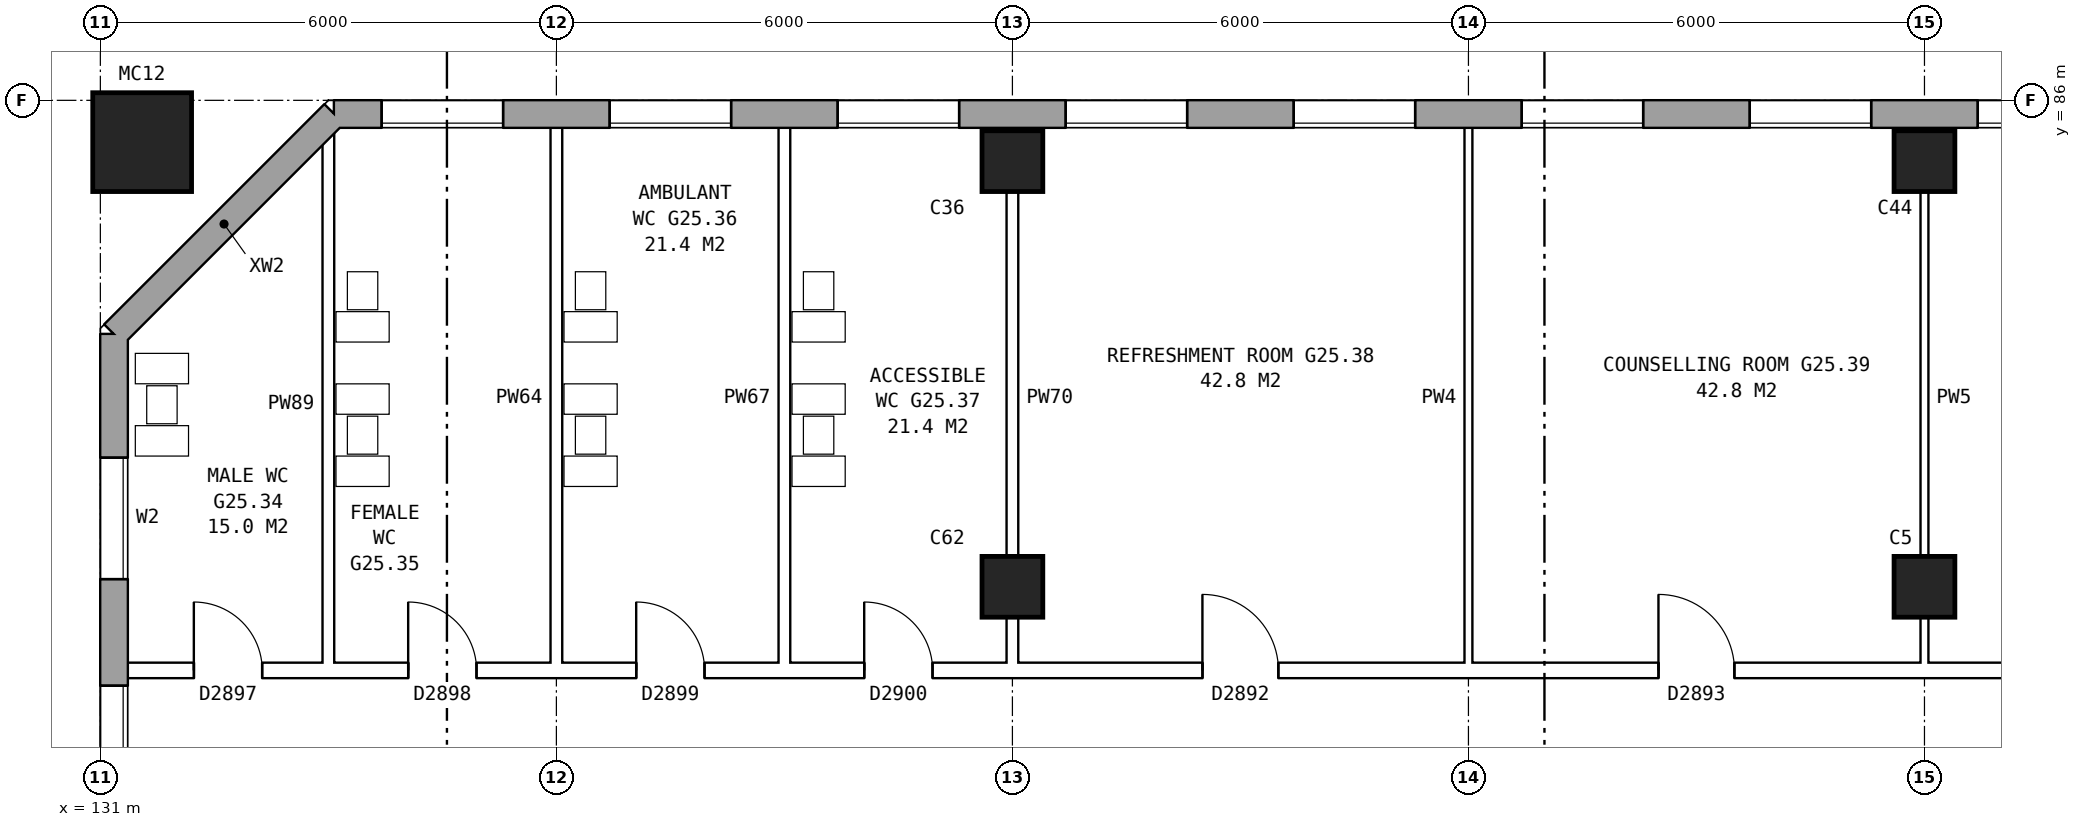
"""IFC4 building model, lengths in metres.
Left out: names, types, materials, properties, quantities, classifications, styles, units other than length and angle.
Written with IfcOpenShell. Run it as: python <this file> out.ifc"""

import sys

from ifc_helpers import new_model, si_unit, direction, frame, frame_2d, origin, origin_2d, place, context, subcontext, project, spatial, rectangle, hollow_rectangle, extrude, element, fill, save


model = new_model("IFC4")
c1 = context("Model", 3, precision=1e-05, world=origin(), true_north=direction((0.0, 1.0)))
c2 = subcontext(c1, "Body", "Model", "MODEL_VIEW")
j1 = project(units=[si_unit("LENGTHUNIT", "METRE"), si_unit("PLANEANGLEUNIT", "RADIAN")], contexts=[c1])
p1 = place(None, origin())
s1 = spatial("IfcSite", under=j1, at=p1, CompositionType="ELEMENT")
p2 = place(p1, origin())
s2 = spatial("IfcBuilding", under=s1, at=p2, CompositionType="ELEMENT")
p3 = place(p2, frame((0.0, 0.0, 90.2)))
s3 = spatial("IfcBuildingStorey", under=s2, at=p3, CompositionType="ELEMENT", Elevation=90.2)
for number, where, z_axis, x_axis in (
    (1, (143.0, 79.6, 0.0), (0.0, 0.0, 1.0), (1.0, 0.0, 0.0)),
    (2, (143.0, 85.2, 0.0), (0.0, 0.0, 1.0), (1.0, 0.0, 0.0)),
    (3, (155.0, 79.6, 0.0), (0.0, 0.0, 1.0), (1.0, 0.0, 0.0)),
    (4, (155.0, 85.2, 0.0), (0.0, 0.0, 1.0), (1.0, 0.0, 0.0)),
):
    element("IfcColumn", number, at=place(p3, frame(where, z_axis=z_axis, x_axis=x_axis)), inside=s3, PredefinedType="COLUMN", context=c2, shape_type="SweptSolid", body=[
        extrude(rectangle(XDim=0.8, YDim=0.8, at=origin_2d()), origin(), (0.0, 0.0, 1.0), 5.6),
    ])
p4 = place(p3, frame((131.55, 85.45, 0.0), z_axis=(0.0, 0.0, 1.0), x_axis=(1.0, 0.0, 0.0)))
e5 = element("IfcColumn", 5, at=p4, inside=s3, PredefinedType="COLUMN", context=c2, shape_type="SweptSolid", body=[
    extrude(hollow_rectangle(XDim=1.3, YDim=1.3, WallThickness=0.07, at=origin_2d()), origin(), (0.0, 0.0, 1.0), 6.2),
])
p5 = place(p3, frame((170.925, 85.82, 0.0), z_axis=(0.0, 0.0, 1.0), x_axis=(-1.0, 0.0, 0.0)))
e6 = element("IfcWall", 6, at=p5, inside=s3, PredefinedType="STANDARD", context=c2, shape_type="SweptSolid", body=[
    extrude(rectangle(XDim=36.851, YDim=0.36, at=frame_2d((18.425, 0.0))), origin(), (0.0, 0.0, 1.0), 5.6),
])
p6 = place(p5, frame((1.625, 0.0, 0.15)))
e7 = element("IfcOpeningElement", 7, at=p6, cuts=e6, PredefinedType="OPENING", context=c2, shape_type="SweptSolid", body=[
    extrude(rectangle(XDim=1.6, YDim=2.4, at=frame_2d((0.8, 1.2))), frame((0.0, 0.19, 0.0), z_axis=(0.0, -1.0, 0.0), x_axis=(1.0, 0.0, 0.0)), (0.0, 0.0, 1.0), 0.38),
])
p7 = place(p5, frame((4.625, 0.0, 0.15)))
e8 = element("IfcOpeningElement", 8, at=p7, cuts=e6, PredefinedType="OPENING", context=c2, shape_type="SweptSolid", body=[
    extrude(rectangle(XDim=1.6, YDim=2.4, at=frame_2d((0.8, 1.2))), frame((0.0, 0.19, 0.0), z_axis=(0.0, -1.0, 0.0), x_axis=(1.0, 0.0, 0.0)), (0.0, 0.0, 1.0), 0.38),
])
p8 = place(p5, frame((7.625, 0.0, 0.15)))
e9 = element("IfcOpeningElement", 9, at=p8, cuts=e6, PredefinedType="OPENING", context=c2, shape_type="SweptSolid", body=[
    extrude(rectangle(XDim=1.6, YDim=2.4, at=frame_2d((0.8, 1.2))), frame((0.0, 0.19, 0.0), z_axis=(0.0, -1.0, 0.0), x_axis=(1.0, 0.0, 0.0)), (0.0, 0.0, 1.0), 0.38),
])
p9 = place(p5, frame((10.625, 0.0, 0.15)))
e10 = element("IfcOpeningElement", 10, at=p9, cuts=e6, PredefinedType="OPENING", context=c2, shape_type="SweptSolid", body=[
    extrude(rectangle(XDim=1.6, YDim=2.4, at=frame_2d((0.8, 1.2))), frame((0.0, 0.19, 0.0), z_axis=(0.0, -1.0, 0.0), x_axis=(1.0, 0.0, 0.0)), (0.0, 0.0, 1.0), 0.38),
])
p10 = place(p5, frame((13.625, 0.0, 0.15)))
e11 = element("IfcOpeningElement", 11, at=p10, cuts=e6, PredefinedType="OPENING", context=c2, shape_type="SweptSolid", body=[
    extrude(rectangle(XDim=1.6, YDim=2.4, at=frame_2d((0.8, 1.2))), frame((0.0, 0.19, 0.0), z_axis=(0.0, -1.0, 0.0), x_axis=(1.0, 0.0, 0.0)), (0.0, 0.0, 1.0), 0.38),
])
p11 = place(p5, frame((16.625, 0.0, 0.15)))
e12 = element("IfcOpeningElement", 12, at=p11, cuts=e6, PredefinedType="OPENING", context=c2, shape_type="SweptSolid", body=[
    extrude(rectangle(XDim=1.6, YDim=2.4, at=frame_2d((0.8, 1.2))), frame((0.0, 0.19, 0.0), z_axis=(0.0, -1.0, 0.0), x_axis=(1.0, 0.0, 0.0)), (0.0, 0.0, 1.0), 0.38),
])
p12 = place(p5, frame((19.625, 0.0, 0.15)))
e13 = element("IfcOpeningElement", 13, at=p12, cuts=e6, PredefinedType="OPENING", context=c2, shape_type="SweptSolid", body=[
    extrude(rectangle(XDim=1.6, YDim=2.4, at=frame_2d((0.8, 1.2))), frame((0.0, 0.19, 0.0), z_axis=(0.0, -1.0, 0.0), x_axis=(1.0, 0.0, 0.0)), (0.0, 0.0, 1.0), 0.38),
])
p13 = place(p5, frame((22.625, 0.0, 0.15)))
e14 = element("IfcOpeningElement", 14, at=p13, cuts=e6, PredefinedType="OPENING", context=c2, shape_type="SweptSolid", body=[
    extrude(rectangle(XDim=1.6, YDim=2.4, at=frame_2d((0.8, 1.2))), frame((0.0, 0.19, 0.0), z_axis=(0.0, -1.0, 0.0), x_axis=(1.0, 0.0, 0.0)), (0.0, 0.0, 1.0), 0.38),
])
p14 = place(p5, frame((25.625, 0.0, 0.15)))
e15 = element("IfcOpeningElement", 15, at=p14, cuts=e6, PredefinedType="OPENING", context=c2, shape_type="SweptSolid", body=[
    extrude(rectangle(XDim=1.6, YDim=2.4, at=frame_2d((0.8, 1.2))), frame((0.0, 0.19, 0.0), z_axis=(0.0, -1.0, 0.0), x_axis=(1.0, 0.0, 0.0)), (0.0, 0.0, 1.0), 0.38),
])
p15 = place(p5, frame((28.625, 0.0, 0.15)))
e16 = element("IfcOpeningElement", 16, at=p15, cuts=e6, PredefinedType="OPENING", context=c2, shape_type="SweptSolid", body=[
    extrude(rectangle(XDim=1.6, YDim=2.4, at=frame_2d((0.8, 1.2))), frame((0.0, 0.19, 0.0), z_axis=(0.0, -1.0, 0.0), x_axis=(1.0, 0.0, 0.0)), (0.0, 0.0, 1.0), 0.38),
])
p16 = place(p5, frame((31.625, 0.0, 0.15)))
e17 = element("IfcOpeningElement", 17, at=p16, cuts=e6, PredefinedType="OPENING", context=c2, shape_type="SweptSolid", body=[
    extrude(rectangle(XDim=1.6, YDim=2.4, at=frame_2d((0.8, 1.2))), frame((0.0, 0.19, 0.0), z_axis=(0.0, -1.0, 0.0), x_axis=(1.0, 0.0, 0.0)), (0.0, 0.0, 1.0), 0.38),
])
p17 = place(p5, frame((34.625, 0.0, 0.15)))
e18 = element("IfcOpeningElement", 18, at=p17, cuts=e6, PredefinedType="OPENING", context=c2, shape_type="SweptSolid", body=[
    extrude(rectangle(XDim=1.6, YDim=2.4, at=frame_2d((0.8, 1.2))), frame((0.0, 0.19, 0.0), z_axis=(0.0, -1.0, 0.0), x_axis=(1.0, 0.0, 0.0)), (0.0, 0.0, 1.0), 0.38),
])
p18 = place(p3, frame((134.075, 85.82, 0.0), z_axis=(0.0, 0.0, 1.0), x_axis=(-0.707106781187, -0.707106781187, 0.0)))
e19 = element("IfcWall", 19, at=p18, inside=s3, PredefinedType="STANDARD", context=c2, shape_type="SweptSolid", body=[
    extrude(rectangle(XDim=4.094, YDim=0.36, at=frame_2d((2.047, 0.0))), origin(), (0.0, 0.0, 1.0), 5.6),
])
p19 = place(p3, frame((131.18, 82.925, 0.0), z_axis=(0.0, 0.0, 1.0), x_axis=(0.0, -1.0, 0.0)))
e20 = element("IfcWall", 20, at=p19, inside=s3, PredefinedType="STANDARD", context=c2, shape_type="SweptSolid", body=[
    extrude(rectangle(XDim=25.851, YDim=0.36, at=frame_2d((12.925, 0.0))), origin(), (0.0, 0.0, 1.0), 5.6),
])
p20 = place(p19, frame((1.625, 0.0, 0.15)))
e21 = element("IfcOpeningElement", 21, at=p20, cuts=e20, PredefinedType="OPENING", context=c2, shape_type="SweptSolid", body=[
    extrude(rectangle(XDim=1.6, YDim=2.4, at=frame_2d((0.8, 1.2))), frame((0.0, 0.19, 0.0), z_axis=(0.0, -1.0, 0.0), x_axis=(1.0, 0.0, 0.0)), (0.0, 0.0, 1.0), 0.38),
])
p21 = place(p19, frame((4.625, 0.0, 0.15)))
e22 = element("IfcOpeningElement", 22, at=p21, cuts=e20, PredefinedType="OPENING", context=c2, shape_type="SweptSolid", body=[
    extrude(rectangle(XDim=1.6, YDim=2.4, at=frame_2d((0.8, 1.2))), frame((0.0, 0.19, 0.0), z_axis=(0.0, -1.0, 0.0), x_axis=(1.0, 0.0, 0.0)), (0.0, 0.0, 1.0), 0.38),
])
p22 = place(p19, frame((19.625, 0.0, 0.15)))
e23 = element("IfcOpeningElement", 23, at=p22, cuts=e20, PredefinedType="OPENING", context=c2, shape_type="SweptSolid", body=[
    extrude(rectangle(XDim=1.6, YDim=2.4, at=frame_2d((0.8, 1.2))), frame((0.0, 0.19, 0.0), z_axis=(0.0, -1.0, 0.0), x_axis=(1.0, 0.0, 0.0)), (0.0, 0.0, 1.0), 0.38),
])
p23 = place(p19, frame((22.625, 0.0, 0.15)))
e24 = element("IfcOpeningElement", 24, at=p23, cuts=e20, PredefinedType="OPENING", context=c2, shape_type="SweptSolid", body=[
    extrude(rectangle(XDim=1.6, YDim=2.4, at=frame_2d((0.8, 1.2))), frame((0.0, 0.19, 0.0), z_axis=(0.0, -1.0, 0.0), x_axis=(1.0, 0.0, 0.0)), (0.0, 0.0, 1.0), 0.38),
])
p24 = place(p3, frame((131.24, 78.5, 0.0), z_axis=(0.0, 0.0, 1.0), x_axis=(1.0, 0.0, 0.0)))
e25 = element("IfcWall", 25, at=p24, inside=s3, PredefinedType="PARTITIONING", context=c2, shape_type="SweptSolid", body=[
    extrude(rectangle(XDim=42.52, YDim=0.2, at=frame_2d((21.26, 0.0))), origin(), (0.0, 0.0, 1.0), 5.6),
])
p25 = place(p24, frame((0.99, 0.0, 0.0)))
e26 = element("IfcOpeningElement", 26, at=p25, cuts=e25, PredefinedType="OPENING", context=c2, shape_type="SweptSolid", body=[
    extrude(rectangle(XDim=0.9, YDim=2.1, at=frame_2d((0.45, 1.05))), frame((0.0, 0.11, 0.0), z_axis=(0.0, -1.0, 0.0), x_axis=(1.0, 0.0, 0.0)), (0.0, 0.0, 1.0), 0.22),
])
p26 = place(p24, frame((3.81, 0.0, 0.0)))
e27 = element("IfcOpeningElement", 27, at=p26, cuts=e25, PredefinedType="OPENING", context=c2, shape_type="SweptSolid", body=[
    extrude(rectangle(XDim=0.9, YDim=2.1, at=frame_2d((0.45, 1.05))), frame((0.0, 0.11, 0.0), z_axis=(0.0, -1.0, 0.0), x_axis=(1.0, 0.0, 0.0)), (0.0, 0.0, 1.0), 0.22),
])
p27 = place(p24, frame((6.81, 0.0, 0.0)))
e28 = element("IfcOpeningElement", 28, at=p27, cuts=e25, PredefinedType="OPENING", context=c2, shape_type="SweptSolid", body=[
    extrude(rectangle(XDim=0.9, YDim=2.1, at=frame_2d((0.45, 1.05))), frame((0.0, 0.11, 0.0), z_axis=(0.0, -1.0, 0.0), x_axis=(1.0, 0.0, 0.0)), (0.0, 0.0, 1.0), 0.22),
])
p28 = place(p24, frame((9.81, 0.0, 0.0)))
e29 = element("IfcOpeningElement", 29, at=p28, cuts=e25, PredefinedType="OPENING", context=c2, shape_type="SweptSolid", body=[
    extrude(rectangle(XDim=0.9, YDim=2.1, at=frame_2d((0.45, 1.05))), frame((0.0, 0.11, 0.0), z_axis=(0.0, -1.0, 0.0), x_axis=(1.0, 0.0, 0.0)), (0.0, 0.0, 1.0), 0.22),
])
p29 = place(p24, frame((14.26, 0.0, 0.0)))
e30 = element("IfcOpeningElement", 30, at=p29, cuts=e25, PredefinedType="OPENING", context=c2, shape_type="SweptSolid", body=[
    extrude(rectangle(XDim=1.0, YDim=2.1, at=frame_2d((0.5, 1.05))), frame((0.0, 0.11, 0.0), z_axis=(0.0, -1.0, 0.0), x_axis=(1.0, 0.0, 0.0)), (0.0, 0.0, 1.0), 0.22),
])
p30 = place(p24, frame((20.26, 0.0, 0.0)))
e31 = element("IfcOpeningElement", 31, at=p30, cuts=e25, PredefinedType="OPENING", context=c2, shape_type="SweptSolid", body=[
    extrude(rectangle(XDim=1.0, YDim=2.1, at=frame_2d((0.5, 1.05))), frame((0.0, 0.11, 0.0), z_axis=(0.0, -1.0, 0.0), x_axis=(1.0, 0.0, 0.0)), (0.0, 0.0, 1.0), 0.22),
])
p31 = place(p24, frame((26.26, 0.0, 0.0)))
e32 = element("IfcOpeningElement", 32, at=p31, cuts=e25, PredefinedType="OPENING", context=c2, shape_type="SweptSolid", body=[
    extrude(rectangle(XDim=1.0, YDim=2.1, at=frame_2d((0.5, 1.05))), frame((0.0, 0.11, 0.0), z_axis=(0.0, -1.0, 0.0), x_axis=(1.0, 0.0, 0.0)), (0.0, 0.0, 1.0), 0.22),
])
p32 = place(p24, frame((32.26, 0.0, 0.0)))
e33 = element("IfcOpeningElement", 33, at=p32, cuts=e25, PredefinedType="OPENING", context=c2, shape_type="SweptSolid", body=[
    extrude(rectangle(XDim=1.0, YDim=2.1, at=frame_2d((0.5, 1.05))), frame((0.0, 0.11, 0.0), z_axis=(0.0, -1.0, 0.0), x_axis=(1.0, 0.0, 0.0)), (0.0, 0.0, 1.0), 0.22),
])
p33 = place(p24, frame((38.58, 0.0, 0.0)))
e34 = element("IfcOpeningElement", 34, at=p33, cuts=e25, PredefinedType="OPENING", context=c2, shape_type="SweptSolid", body=[
    extrude(rectangle(XDim=1.0, YDim=2.1, at=frame_2d((0.5, 1.05))), frame((0.0, 0.11, 0.0), z_axis=(0.0, -1.0, 0.0), x_axis=(1.0, 0.0, 0.0)), (0.0, 0.0, 1.0), 0.22),
])
p34 = place(p3, frame((134.0, 78.4, 0.0), z_axis=(0.0, 0.0, 1.0), x_axis=(0.0, 1.0, 0.0)))
e35 = element("IfcWall", 35, at=p34, inside=s3, PredefinedType="PLUMBINGWALL", context=c2, shape_type="SweptSolid", body=[
    extrude(rectangle(XDim=7.211, YDim=0.15, at=frame_2d((3.605, 0.0))), origin(), (0.0, 0.0, 1.0), 5.6),
])
for number, where, z_axis, x_axis in (
    (36, (137.0, 78.4, 0.0), (0.0, 0.0, 1.0), (0.0, 1.0, 0.0)),
    (37, (140.0, 78.4, 0.0), (0.0, 0.0, 1.0), (0.0, 1.0, 0.0)),
    (38, (143.0, 78.4, 0.0), (0.0, 0.0, 1.0), (0.0, 1.0, 0.0)),
):
    element("IfcWall", number, at=place(p3, frame(where, z_axis=z_axis, x_axis=x_axis)), inside=s3, PredefinedType="PLUMBINGWALL", context=c2, shape_type="SweptSolid", body=[
        extrude(rectangle(XDim=7.36, YDim=0.15, at=frame_2d((3.68, 0.0))), origin(), (0.0, 0.0, 1.0), 5.6),
    ])
for number, where, z_axis, x_axis in (
    (39, (149.0, 78.4, 0.0), (0.0, 0.0, 1.0), (0.0, 1.0, 0.0)),
    (40, (155.0, 78.4, 0.0), (0.0, 0.0, 1.0), (0.0, 1.0, 0.0)),
):
    element("IfcWall", number, at=place(p3, frame(where, z_axis=z_axis, x_axis=x_axis)), inside=s3, PredefinedType="PARTITIONING", context=c2, shape_type="SweptSolid", body=[
        extrude(rectangle(XDim=7.36, YDim=0.1, at=frame_2d((3.68, 0.0))), origin(), (0.0, 0.0, 1.0), 5.6),
    ])
p35 = place(p10, origin())
e41 = element("IfcWindow", 41, at=p35, inside=s3, PartitioningType="SINGLE_PANEL", PredefinedType="WINDOW", context=c2, shape_type="SweptSolid", body=[
    extrude(rectangle(XDim=1.6, YDim=2.4, at=frame_2d((0.8, 1.2))), frame((0.0, 0.15, 0.0), z_axis=(0.0, -1.0, 0.0), x_axis=(1.0, 0.0, 0.0)), (0.0, 0.0, 1.0), 0.06),
])
fill(e11, e41)
p36 = place(p11, origin())
e42 = element("IfcWindow", 42, at=p36, inside=s3, PartitioningType="SINGLE_PANEL", PredefinedType="WINDOW", context=c2, shape_type="SweptSolid", body=[
    extrude(rectangle(XDim=1.6, YDim=2.4, at=frame_2d((0.8, 1.2))), frame((0.0, 0.15, 0.0), z_axis=(0.0, -1.0, 0.0), x_axis=(1.0, 0.0, 0.0)), (0.0, 0.0, 1.0), 0.06),
])
fill(e12, e42)
p37 = place(p12, origin())
e43 = element("IfcWindow", 43, at=p37, inside=s3, PartitioningType="SINGLE_PANEL", PredefinedType="WINDOW", context=c2, shape_type="SweptSolid", body=[
    extrude(rectangle(XDim=1.6, YDim=2.4, at=frame_2d((0.8, 1.2))), frame((0.0, 0.15, 0.0), z_axis=(0.0, -1.0, 0.0), x_axis=(1.0, 0.0, 0.0)), (0.0, 0.0, 1.0), 0.06),
])
fill(e13, e43)
p38 = place(p13, origin())
e44 = element("IfcWindow", 44, at=p38, inside=s3, PartitioningType="SINGLE_PANEL", PredefinedType="WINDOW", context=c2, shape_type="SweptSolid", body=[
    extrude(rectangle(XDim=1.6, YDim=2.4, at=frame_2d((0.8, 1.2))), frame((0.0, 0.15, 0.0), z_axis=(0.0, -1.0, 0.0), x_axis=(1.0, 0.0, 0.0)), (0.0, 0.0, 1.0), 0.06),
])
fill(e14, e44)
p39 = place(p14, origin())
e45 = element("IfcWindow", 45, at=p39, inside=s3, PartitioningType="SINGLE_PANEL", PredefinedType="WINDOW", context=c2, shape_type="SweptSolid", body=[
    extrude(rectangle(XDim=1.6, YDim=2.4, at=frame_2d((0.8, 1.2))), frame((0.0, 0.15, 0.0), z_axis=(0.0, -1.0, 0.0), x_axis=(1.0, 0.0, 0.0)), (0.0, 0.0, 1.0), 0.06),
])
fill(e15, e45)
p40 = place(p15, origin())
e46 = element("IfcWindow", 46, at=p40, inside=s3, PartitioningType="SINGLE_PANEL", PredefinedType="WINDOW", context=c2, shape_type="SweptSolid", body=[
    extrude(rectangle(XDim=1.6, YDim=2.4, at=frame_2d((0.8, 1.2))), frame((0.0, 0.15, 0.0), z_axis=(0.0, -1.0, 0.0), x_axis=(1.0, 0.0, 0.0)), (0.0, 0.0, 1.0), 0.06),
])
fill(e16, e46)
p41 = place(p16, origin())
e47 = element("IfcWindow", 47, at=p41, inside=s3, PartitioningType="SINGLE_PANEL", PredefinedType="WINDOW", context=c2, shape_type="SweptSolid", body=[
    extrude(rectangle(XDim=1.6, YDim=2.4, at=frame_2d((0.8, 1.2))), frame((0.0, 0.15, 0.0), z_axis=(0.0, -1.0, 0.0), x_axis=(1.0, 0.0, 0.0)), (0.0, 0.0, 1.0), 0.06),
])
fill(e17, e47)
p42 = place(p17, origin())
e48 = element("IfcWindow", 48, at=p42, inside=s3, PartitioningType="SINGLE_PANEL", PredefinedType="WINDOW", context=c2, shape_type="SweptSolid", body=[
    extrude(rectangle(XDim=1.6, YDim=2.4, at=frame_2d((0.8, 1.2))), frame((0.0, 0.15, 0.0), z_axis=(0.0, -1.0, 0.0), x_axis=(1.0, 0.0, 0.0)), (0.0, 0.0, 1.0), 0.06),
])
fill(e18, e48)
p43 = place(p20, origin())
e49 = element("IfcWindow", 49, at=p43, inside=s3, PartitioningType="SINGLE_PANEL", PredefinedType="WINDOW", context=c2, shape_type="SweptSolid", body=[
    extrude(rectangle(XDim=1.6, YDim=2.4, at=frame_2d((0.8, 1.2))), frame((0.0, 0.15, 0.0), z_axis=(0.0, -1.0, 0.0), x_axis=(1.0, 0.0, 0.0)), (0.0, 0.0, 1.0), 0.06),
])
fill(e21, e49)
p44 = place(p21, origin())
e50 = element("IfcWindow", 50, at=p44, inside=s3, PartitioningType="SINGLE_PANEL", PredefinedType="WINDOW", context=c2, shape_type="SweptSolid", body=[
    extrude(rectangle(XDim=1.6, YDim=2.4, at=frame_2d((0.8, 1.2))), frame((0.0, 0.15, 0.0), z_axis=(0.0, -1.0, 0.0), x_axis=(1.0, 0.0, 0.0)), (0.0, 0.0, 1.0), 0.06),
])
fill(e22, e50)
p45 = place(p25, origin())
e51 = element("IfcDoor", 51, at=p45, inside=s3, OperationType="SINGLE_SWING_LEFT", PredefinedType="DOOR", context=c2, shape_type="SweptSolid", body=[
    extrude(rectangle(XDim=0.9, YDim=2.1, at=frame_2d((0.45, 1.05))), frame((0.0, 0.025, 0.0), z_axis=(0.0, -1.0, 0.0), x_axis=(1.0, 0.0, 0.0)), (0.0, 0.0, 1.0), 0.05),
])
fill(e26, e51)
p46 = place(p26, origin())
e52 = element("IfcDoor", 52, at=p46, inside=s3, OperationType="SINGLE_SWING_LEFT", PredefinedType="DOOR", context=c2, shape_type="SweptSolid", body=[
    extrude(rectangle(XDim=0.9, YDim=2.1, at=frame_2d((0.45, 1.05))), frame((0.0, 0.025, 0.0), z_axis=(0.0, -1.0, 0.0), x_axis=(1.0, 0.0, 0.0)), (0.0, 0.0, 1.0), 0.05),
])
fill(e27, e52)
p47 = place(p27, origin())
e53 = element("IfcDoor", 53, at=p47, inside=s3, OperationType="SINGLE_SWING_LEFT", PredefinedType="DOOR", context=c2, shape_type="SweptSolid", body=[
    extrude(rectangle(XDim=0.9, YDim=2.1, at=frame_2d((0.45, 1.05))), frame((0.0, 0.025, 0.0), z_axis=(0.0, -1.0, 0.0), x_axis=(1.0, 0.0, 0.0)), (0.0, 0.0, 1.0), 0.05),
])
fill(e28, e53)
p48 = place(p28, origin())
e54 = element("IfcDoor", 54, at=p48, inside=s3, OperationType="SINGLE_SWING_LEFT", PredefinedType="DOOR", context=c2, shape_type="SweptSolid", body=[
    extrude(rectangle(XDim=0.9, YDim=2.1, at=frame_2d((0.45, 1.05))), frame((0.0, 0.025, 0.0), z_axis=(0.0, -1.0, 0.0), x_axis=(1.0, 0.0, 0.0)), (0.0, 0.0, 1.0), 0.05),
])
fill(e29, e54)
p49 = place(p29, origin())
e55 = element("IfcDoor", 55, at=p49, inside=s3, OperationType="SINGLE_SWING_LEFT", PredefinedType="DOOR", context=c2, shape_type="SweptSolid", body=[
    extrude(rectangle(XDim=1.0, YDim=2.1, at=frame_2d((0.5, 1.05))), frame((0.0, 0.025, 0.0), z_axis=(0.0, -1.0, 0.0), x_axis=(1.0, 0.0, 0.0)), (0.0, 0.0, 1.0), 0.05),
])
fill(e30, e55)
p50 = place(p30, origin())
e56 = element("IfcDoor", 56, at=p50, inside=s3, OperationType="SINGLE_SWING_LEFT", PredefinedType="DOOR", context=c2, shape_type="SweptSolid", body=[
    extrude(rectangle(XDim=1.0, YDim=2.1, at=frame_2d((0.5, 1.05))), frame((0.0, 0.025, 0.0), z_axis=(0.0, -1.0, 0.0), x_axis=(1.0, 0.0, 0.0)), (0.0, 0.0, 1.0), 0.05),
])
fill(e31, e56)
save(model, sys.argv[1])
